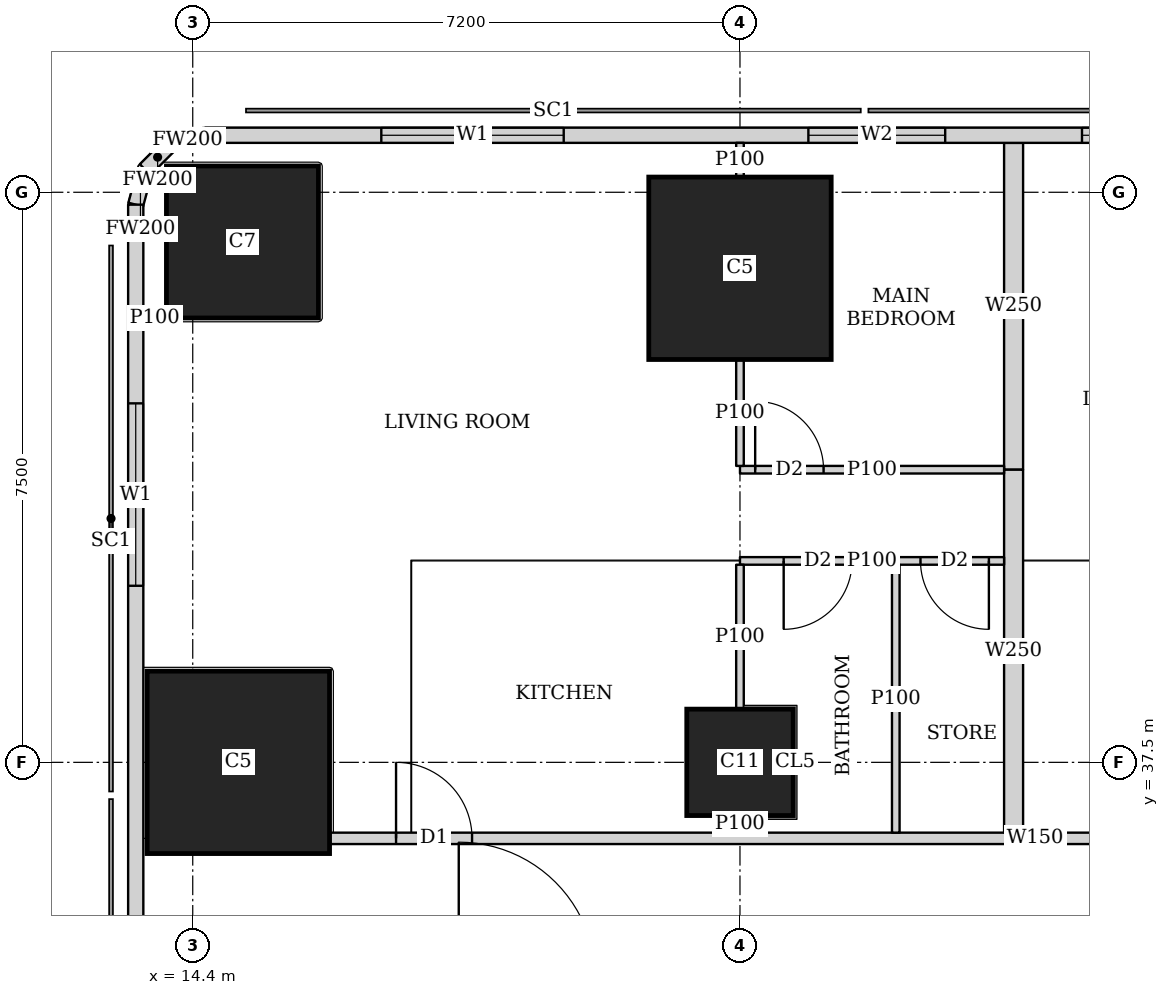
"""IFC4 building model, lengths in metres.
Left out: names, types, materials, properties, quantities, classifications, styles, units other than length and angle.
Written with IfcOpenShell. Run it as: python <this file> out.ifc"""

import sys

from ifc_helpers import new_model, si_unit, direction, frame, frame_2d, origin, origin_2d, place, context, subcontext, project, spatial, rectangle, extrude, element, fill, save


model = new_model("IFC4")
c1 = context("Model", 3, precision=1e-05, world=origin(), true_north=direction((0.0, 1.0)))
c2 = subcontext(c1, "Body", "Model", "MODEL_VIEW")
j1 = project(units=[si_unit("LENGTHUNIT", "METRE"), si_unit("PLANEANGLEUNIT", "RADIAN")], contexts=[c1])
p1 = place(None, origin())
s1 = spatial("IfcSite", under=j1, at=p1, CompositionType="ELEMENT")
p2 = place(p1, origin())
s2 = spatial("IfcBuilding", under=s1, at=p2, CompositionType="ELEMENT")
p3 = place(p2, frame((0.0, 0.0, 227.45)))
s3 = spatial("IfcBuildingStorey", under=s2, at=p3, CompositionType="ELEMENT", Elevation=227.45)
p4 = place(p3, frame((15.0, 37.5, 0.0), z_axis=(0.0, 0.0, 1.0), x_axis=(1.0, 0.0, 0.0)))
e1 = element("IfcColumn", 1, at=p4, inside=s3, PredefinedType="COLUMN", context=c2, shape_type="SweptSolid", body=[
    extrude(rectangle(XDim=2.4, YDim=2.4, at=origin_2d()), origin(), (0.0, 0.0, 1.0), 3.75),
])
p5 = place(p3, frame((21.6, 37.5, 0.0), z_axis=(0.0, 0.0, 1.0), x_axis=(1.0, 0.0, 0.0)))
e2 = element("IfcColumn", 2, at=p5, inside=s3, PredefinedType="COLUMN", context=c2, shape_type="SweptSolid", body=[
    extrude(rectangle(XDim=1.4, YDim=1.4, at=origin_2d()), origin(), (0.0, 0.0, 1.0), 3.75),
])
p6 = place(p3, frame((15.054, 44.346, 0.0), z_axis=(0.0, 0.0, 1.0), x_axis=(1.0, 0.0, 0.0)))
e3 = element("IfcColumn", 3, at=p6, inside=s3, PredefinedType="COLUMN", context=c2, shape_type="SweptSolid", body=[
    extrude(rectangle(XDim=2.0, YDim=2.0, at=origin_2d()), origin(), (0.0, 0.0, 1.0), 3.75),
])
p7 = place(p3, frame((21.6, 44.0, 0.0), z_axis=(0.0, 0.0, 1.0), x_axis=(1.0, 0.0, 0.0)))
e4 = element("IfcColumn", 4, at=p7, inside=s3, PredefinedType="COLUMN", context=c2, shape_type="SweptSolid", body=[
    extrude(rectangle(XDim=2.4, YDim=2.4, at=origin_2d()), origin(), (0.0, 0.0, 1.0), 3.75),
])
p8 = place(p3, frame((40.106, 45.75, 0.0), z_axis=(0.0, 0.0, 1.0), x_axis=(-1.0, 0.0, 0.0)))
e5 = element("IfcWall", 5, at=p8, inside=s3, PredefinedType="SOLIDWALL", context=c2, shape_type="SweptSolid", body=[
    extrude(rectangle(XDim=25.543, YDim=0.2, at=frame_2d((12.771, 0.0))), origin(), (0.0, 0.0, 1.0), 3.5),
])
p9 = place(p8, frame((8.606, 0.0, 0.9)))
e6 = element("IfcOpeningElement", 6, at=p9, cuts=e5, PredefinedType="OPENING", context=c2, shape_type="SweptSolid", body=[
    extrude(rectangle(XDim=1.8, YDim=1.5, at=frame_2d((0.9, 0.75))), frame((0.0, 0.11, 0.0), z_axis=(0.0, -1.0, 0.0), x_axis=(1.0, 0.0, 0.0)), (0.0, 0.0, 1.0), 0.22),
])
p10 = place(p8, frame((12.206, 0.0, 0.9)))
e7 = element("IfcOpeningElement", 7, at=p10, cuts=e5, PredefinedType="OPENING", context=c2, shape_type="SweptSolid", body=[
    extrude(rectangle(XDim=1.8, YDim=1.5, at=frame_2d((0.9, 0.75))), frame((0.0, 0.11, 0.0), z_axis=(0.0, -1.0, 0.0), x_axis=(1.0, 0.0, 0.0)), (0.0, 0.0, 1.0), 0.22),
])
p11 = place(p8, frame((15.806, 0.0, 0.9)))
e8 = element("IfcOpeningElement", 8, at=p11, cuts=e5, PredefinedType="OPENING", context=c2, shape_type="SweptSolid", body=[
    extrude(rectangle(XDim=1.8, YDim=1.5, at=frame_2d((0.9, 0.75))), frame((0.0, 0.11, 0.0), z_axis=(0.0, -1.0, 0.0), x_axis=(1.0, 0.0, 0.0)), (0.0, 0.0, 1.0), 0.22),
])
p12 = place(p8, frame((20.825, 0.0, 0.9)))
e9 = element("IfcOpeningElement", 9, at=p12, cuts=e5, PredefinedType="OPENING", context=c2, shape_type="SweptSolid", body=[
    extrude(rectangle(XDim=2.4, YDim=1.5, at=frame_2d((1.2, 0.75))), frame((0.0, 0.11, 0.0), z_axis=(0.0, -1.0, 0.0), x_axis=(1.0, 0.0, 0.0)), (0.0, 0.0, 1.0), 0.22),
])
p13 = place(p3, frame((14.563, 45.75, 0.0), z_axis=(0.0, 0.0, 1.0), x_axis=(-0.965655254015, -0.259826731483, 0.0)))
e10 = element("IfcWall", 10, at=p13, inside=s3, PredefinedType="SOLIDWALL", context=c2, shape_type="SweptSolid", body=[
    extrude(rectangle(XDim=0.477, YDim=0.2, at=frame_2d((0.239, 0.0))), origin(), (0.0, 0.0, 1.0), 3.5),
])
p14 = place(p3, frame((14.102, 45.626, 0.0), z_axis=(0.0, 0.0, 1.0), x_axis=(-0.707369890659, -0.706843573776, 0.0)))
e11 = element("IfcWall", 11, at=p14, inside=s3, PredefinedType="SOLIDWALL", context=c2, shape_type="SweptSolid", body=[
    extrude(rectangle(XDim=0.464, YDim=0.2, at=frame_2d((0.232, 0.0))), origin(), (0.0, 0.0, 1.0), 3.5),
])
p15 = place(p3, frame((13.774, 45.298, 0.0), z_axis=(0.0, 0.0, 1.0), x_axis=(-0.259698463175, -0.965689757751, 0.0)))
e12 = element("IfcWall", 12, at=p15, inside=s3, PredefinedType="SOLIDWALL", context=c2, shape_type="SweptSolid", body=[
    extrude(rectangle(XDim=0.478, YDim=0.2, at=frame_2d((0.239, 0.0))), origin(), (0.0, 0.0, 1.0), 3.5),
])
p16 = place(p3, frame((13.65, 44.837, 0.0), z_axis=(0.0, 0.0, 1.0), x_axis=(0.0, -1.0, 0.0)))
e13 = element("IfcWall", 13, at=p16, inside=s3, PredefinedType="SOLIDWALL", context=c2, shape_type="SweptSolid", body=[
    extrude(rectangle(XDim=44.674, YDim=0.2, at=frame_2d((22.337, 0.0))), origin(), (0.0, 0.0, 1.0), 3.5),
])
p17 = place(p16, frame((2.614, 0.0, 0.9)))
e14 = element("IfcOpeningElement", 14, at=p17, cuts=e13, PredefinedType="OPENING", context=c2, shape_type="SweptSolid", body=[
    extrude(rectangle(XDim=2.4, YDim=1.5, at=frame_2d((1.2, 0.75))), frame((0.0, 0.11, 0.0), z_axis=(0.0, -1.0, 0.0), x_axis=(1.0, 0.0, 0.0)), (0.0, 0.0, 1.0), 0.22),
])
p18 = place(p16, frame((39.333, 0.0, 0.9)))
e15 = element("IfcOpeningElement", 15, at=p18, cuts=e13, PredefinedType="OPENING", context=c2, shape_type="SweptSolid", body=[
    extrude(rectangle(XDim=2.4, YDim=1.5, at=frame_2d((1.2, 0.75))), frame((0.0, 0.11, 0.0), z_axis=(0.0, -1.0, 0.0), x_axis=(1.0, 0.0, 0.0)), (0.0, 0.0, 1.0), 0.22),
])
p19 = place(p3, frame((16.201, 36.5, 0.0), z_axis=(0.0, 0.0, 1.0), x_axis=(1.0, 0.0, 0.0)))
e16 = element("IfcWall", 16, at=p19, inside=s3, PredefinedType="SOLIDWALL", context=c2, shape_type="SweptSolid", body=[
    extrude(rectangle(XDim=18.564, YDim=0.15, at=frame_2d((9.282, 0.0))), origin(), (0.0, 0.0, 1.0), 3.5),
])
p20 = place(p19, frame((0.874, 0.0, 0.0)))
e17 = element("IfcOpeningElement", 17, at=p20, cuts=e16, PredefinedType="OPENING", context=c2, shape_type="SweptSolid", body=[
    extrude(rectangle(XDim=1.0, YDim=2.1, at=frame_2d((0.5, 1.05))), frame((0.0, 0.085, 0.0), z_axis=(0.0, -1.0, 0.0), x_axis=(1.0, 0.0, 0.0)), (0.0, 0.0, 1.0), 0.17),
])
p21 = place(p19, frame((10.156, 0.0, 0.0)))
e18 = element("IfcOpeningElement", 18, at=p21, cuts=e16, PredefinedType="OPENING", context=c2, shape_type="SweptSolid", body=[
    extrude(rectangle(XDim=1.0, YDim=2.1, at=frame_2d((0.5, 1.05))), frame((0.0, 0.085, 0.0), z_axis=(0.0, -1.0, 0.0), x_axis=(1.0, 0.0, 0.0)), (0.0, 0.0, 1.0), 0.17),
])
p22 = place(p3, frame((14.054, 43.346, 0.0), z_axis=(0.0, 0.0, 1.0), x_axis=(-1.0, 0.0, 0.0)))
e19 = element("IfcWall", 19, at=p22, inside=s3, PredefinedType="PARTITIONING", context=c2, shape_type="SweptSolid", body=[
    extrude(rectangle(XDim=0.304, YDim=0.1, at=frame_2d((0.152, 0.0))), origin(), (0.0, 0.0, 1.0), 2.05),
])
p23 = place(p3, frame((21.6, 41.35, 0.0), z_axis=(0.0, 0.0, 1.0), x_axis=(1.0, 0.0, 0.0)))
e20 = element("IfcWall", 20, at=p23, inside=s3, PredefinedType="PARTITIONING", context=c2, shape_type="SweptSolid", body=[
    extrude(rectangle(XDim=3.475, YDim=0.1, at=frame_2d((1.737, 0.0))), origin(), (0.0, 0.0, 1.0), 3.5),
])
p24 = place(p23, frame((0.2, 0.0, 0.0)))
e21 = element("IfcOpeningElement", 21, at=p24, cuts=e20, PredefinedType="OPENING", context=c2, shape_type="SweptSolid", body=[
    extrude(rectangle(XDim=0.9, YDim=2.1, at=frame_2d((0.45, 1.05))), frame((0.0, 0.06, 0.0), z_axis=(0.0, -1.0, 0.0), x_axis=(1.0, 0.0, 0.0)), (0.0, 0.0, 1.0), 0.12),
])
p25 = place(p3, frame((21.6, 40.15, 0.0), z_axis=(0.0, 0.0, 1.0), x_axis=(1.0, 0.0, 0.0)))
e22 = element("IfcWall", 22, at=p25, inside=s3, PredefinedType="PARTITIONING", context=c2, shape_type="SweptSolid", body=[
    extrude(rectangle(XDim=3.475, YDim=0.1, at=frame_2d((1.737, 0.0))), origin(), (0.0, 0.0, 1.0), 3.5),
])
p26 = place(p25, frame((0.575, 0.0, 0.0)))
e23 = element("IfcOpeningElement", 23, at=p26, cuts=e22, PredefinedType="OPENING", context=c2, shape_type="SweptSolid", body=[
    extrude(rectangle(XDim=0.9, YDim=2.1, at=frame_2d((0.45, 1.05))), frame((0.0, 0.06, 0.0), z_axis=(0.0, -1.0, 0.0), x_axis=(1.0, 0.0, 0.0)), (0.0, 0.0, 1.0), 0.12),
])
p27 = place(p25, frame((2.375, 0.0, 0.0)))
e24 = element("IfcOpeningElement", 24, at=p27, cuts=e22, PredefinedType="OPENING", context=c2, shape_type="SweptSolid", body=[
    extrude(rectangle(XDim=0.9, YDim=2.1, at=frame_2d((0.45, 1.05))), frame((0.0, 0.06, 0.0), z_axis=(0.0, -1.0, 0.0), x_axis=(1.0, 0.0, 0.0)), (0.0, 0.0, 1.0), 0.12),
])
p28 = place(p3, frame((21.6, 41.4, 0.0), z_axis=(0.0, 0.0, 1.0), x_axis=(0.0, 1.0, 0.0)))
e25 = element("IfcWall", 25, at=p28, inside=s3, PredefinedType="PARTITIONING", context=c2, shape_type="SweptSolid", body=[
    extrude(rectangle(XDim=1.399, YDim=0.1, at=frame_2d((0.7, 0.0))), origin(), (0.0, 0.0, 1.0), 3.5),
])
p29 = place(p3, frame((21.6, 45.201, 0.0), z_axis=(0.0, 0.0, 1.0), x_axis=(0.0, 1.0, 0.0)))
e26 = element("IfcWall", 26, at=p29, inside=s3, PredefinedType="PARTITIONING", context=c2, shape_type="SweptSolid", body=[
    extrude(rectangle(XDim=0.449, YDim=0.1, at=frame_2d((0.225, 0.0))), origin(), (0.0, 0.0, 1.0), 3.5),
])
p30 = place(p3, frame((21.6, 36.575, 0.0), z_axis=(0.0, 0.0, 1.0), x_axis=(0.0, 1.0, 0.0)))
e27 = element("IfcWall", 27, at=p30, inside=s3, PredefinedType="PARTITIONING", context=c2, shape_type="SweptSolid", body=[
    extrude(rectangle(XDim=0.224, YDim=0.1, at=frame_2d((0.112, 0.0))), origin(), (0.0, 0.0, 1.0), 3.5),
])
p31 = place(p3, frame((21.6, 38.201, 0.0), z_axis=(0.0, 0.0, 1.0), x_axis=(0.0, 1.0, 0.0)))
e28 = element("IfcWall", 28, at=p31, inside=s3, PredefinedType="PARTITIONING", context=c2, shape_type="SweptSolid", body=[
    extrude(rectangle(XDim=1.899, YDim=0.1, at=frame_2d((0.95, 0.0))), origin(), (0.0, 0.0, 1.0), 3.5),
])
p32 = place(p3, frame((23.65, 36.575, 0.0), z_axis=(0.0, 0.0, 1.0), x_axis=(0.0, 1.0, 0.0)))
e29 = element("IfcWall", 29, at=p32, inside=s3, PredefinedType="PARTITIONING", context=c2, shape_type="SweptSolid", body=[
    extrude(rectangle(XDim=3.525, YDim=0.1, at=frame_2d((1.763, 0.0))), origin(), (0.0, 0.0, 1.0), 3.5),
])
p33 = place(p3, frame((25.2, 41.35, 0.0), z_axis=(0.0, 0.0, 1.0), x_axis=(0.0, 1.0, 0.0)))
e30 = element("IfcWall", 30, at=p33, inside=s3, PredefinedType="SOLIDWALL", context=c2, shape_type="SweptSolid", body=[
    extrude(rectangle(XDim=4.3, YDim=0.25, at=frame_2d((2.15, 0.0))), origin(), (0.0, 0.0, 1.0), 2.05),
])
p34 = place(p3, frame((25.2, 36.575, 0.0), z_axis=(0.0, 0.0, 1.0), x_axis=(0.0, 1.0, 0.0)))
e31 = element("IfcWall", 31, at=p34, inside=s3, PredefinedType="SOLIDWALL", context=c2, shape_type="SweptSolid", body=[
    extrude(rectangle(XDim=4.775, YDim=0.25, at=frame_2d((2.388, 0.0))), origin(), (0.0, 0.0, 1.0), 3.5),
])
p35 = place(p10, origin())
e32 = element("IfcWindow", 32, at=p35, inside=s3, PartitioningType="SINGLE_PANEL", PredefinedType="WINDOW", context=c2, shape_type="SweptSolid", body=[
    extrude(rectangle(XDim=1.8, YDim=1.5, at=frame_2d((0.9, 0.75))), frame((0.0, 0.03, 0.0), z_axis=(0.0, -1.0, 0.0), x_axis=(1.0, 0.0, 0.0)), (0.0, 0.0, 1.0), 0.06),
])
fill(e7, e32)
p36 = place(p11, origin())
e33 = element("IfcWindow", 33, at=p36, inside=s3, PartitioningType="SINGLE_PANEL", PredefinedType="WINDOW", context=c2, shape_type="SweptSolid", body=[
    extrude(rectangle(XDim=1.8, YDim=1.5, at=frame_2d((0.9, 0.75))), frame((0.0, 0.03, 0.0), z_axis=(0.0, -1.0, 0.0), x_axis=(1.0, 0.0, 0.0)), (0.0, 0.0, 1.0), 0.06),
])
fill(e8, e33)
p37 = place(p12, origin())
e34 = element("IfcWindow", 34, at=p37, inside=s3, PartitioningType="SINGLE_PANEL", PredefinedType="WINDOW", context=c2, shape_type="SweptSolid", body=[
    extrude(rectangle(XDim=2.4, YDim=1.5, at=frame_2d((1.2, 0.75))), frame((0.0, 0.03, 0.0), z_axis=(0.0, -1.0, 0.0), x_axis=(1.0, 0.0, 0.0)), (0.0, 0.0, 1.0), 0.06),
])
fill(e9, e34)
p38 = place(p17, origin())
e35 = element("IfcWindow", 35, at=p38, inside=s3, PartitioningType="SINGLE_PANEL", PredefinedType="WINDOW", context=c2, shape_type="SweptSolid", body=[
    extrude(rectangle(XDim=2.4, YDim=1.5, at=frame_2d((1.2, 0.75))), frame((0.0, 0.03, 0.0), z_axis=(0.0, -1.0, 0.0), x_axis=(1.0, 0.0, 0.0)), (0.0, 0.0, 1.0), 0.06),
])
fill(e14, e35)
p39 = place(p24, origin())
e36 = element("IfcDoor", 36, at=p39, inside=s3, OperationType="SINGLE_SWING_LEFT", PredefinedType="DOOR", context=c2, shape_type="SweptSolid", body=[
    extrude(rectangle(XDim=0.9, YDim=2.1, at=frame_2d((0.45, 1.05))), frame((0.0, 0.025, 0.0), z_axis=(0.0, -1.0, 0.0), x_axis=(1.0, 0.0, 0.0)), (0.0, 0.0, 1.0), 0.05),
])
fill(e21, e36)
p40 = place(p26, origin())
e37 = element("IfcDoor", 37, at=p40, inside=s3, OperationType="SINGLE_SWING_RIGHT", PredefinedType="DOOR", context=c2, shape_type="SweptSolid", body=[
    extrude(rectangle(XDim=0.9, YDim=2.1, at=frame_2d((0.45, 1.05))), frame((0.0, 0.025, 0.0), z_axis=(0.0, -1.0, 0.0), x_axis=(1.0, 0.0, 0.0)), (0.0, 0.0, 1.0), 0.05),
])
fill(e23, e37)
p41 = place(p27, origin())
e38 = element("IfcDoor", 38, at=p41, inside=s3, OperationType="SINGLE_SWING_LEFT", PredefinedType="DOOR", context=c2, shape_type="SweptSolid", body=[
    extrude(rectangle(XDim=0.9, YDim=2.1, at=frame_2d((0.45, 1.05))), frame((0.0, 0.025, 0.0), z_axis=(0.0, -1.0, 0.0), x_axis=(1.0, 0.0, 0.0)), (0.0, 0.0, 1.0), 0.05),
])
fill(e24, e38)
p42 = place(p20, origin())
e39 = element("IfcDoor", 39, at=p42, inside=s3, OperationType="SINGLE_SWING_LEFT", PredefinedType="DOOR", context=c2, shape_type="SweptSolid", body=[
    extrude(rectangle(XDim=1.0, YDim=2.1, at=frame_2d((0.5, 1.05))), frame((0.0, 0.025, 0.0), z_axis=(0.0, -1.0, 0.0), x_axis=(1.0, 0.0, 0.0)), (0.0, 0.0, 1.0), 0.05),
])
fill(e17, e39)
save(model, sys.argv[1])
